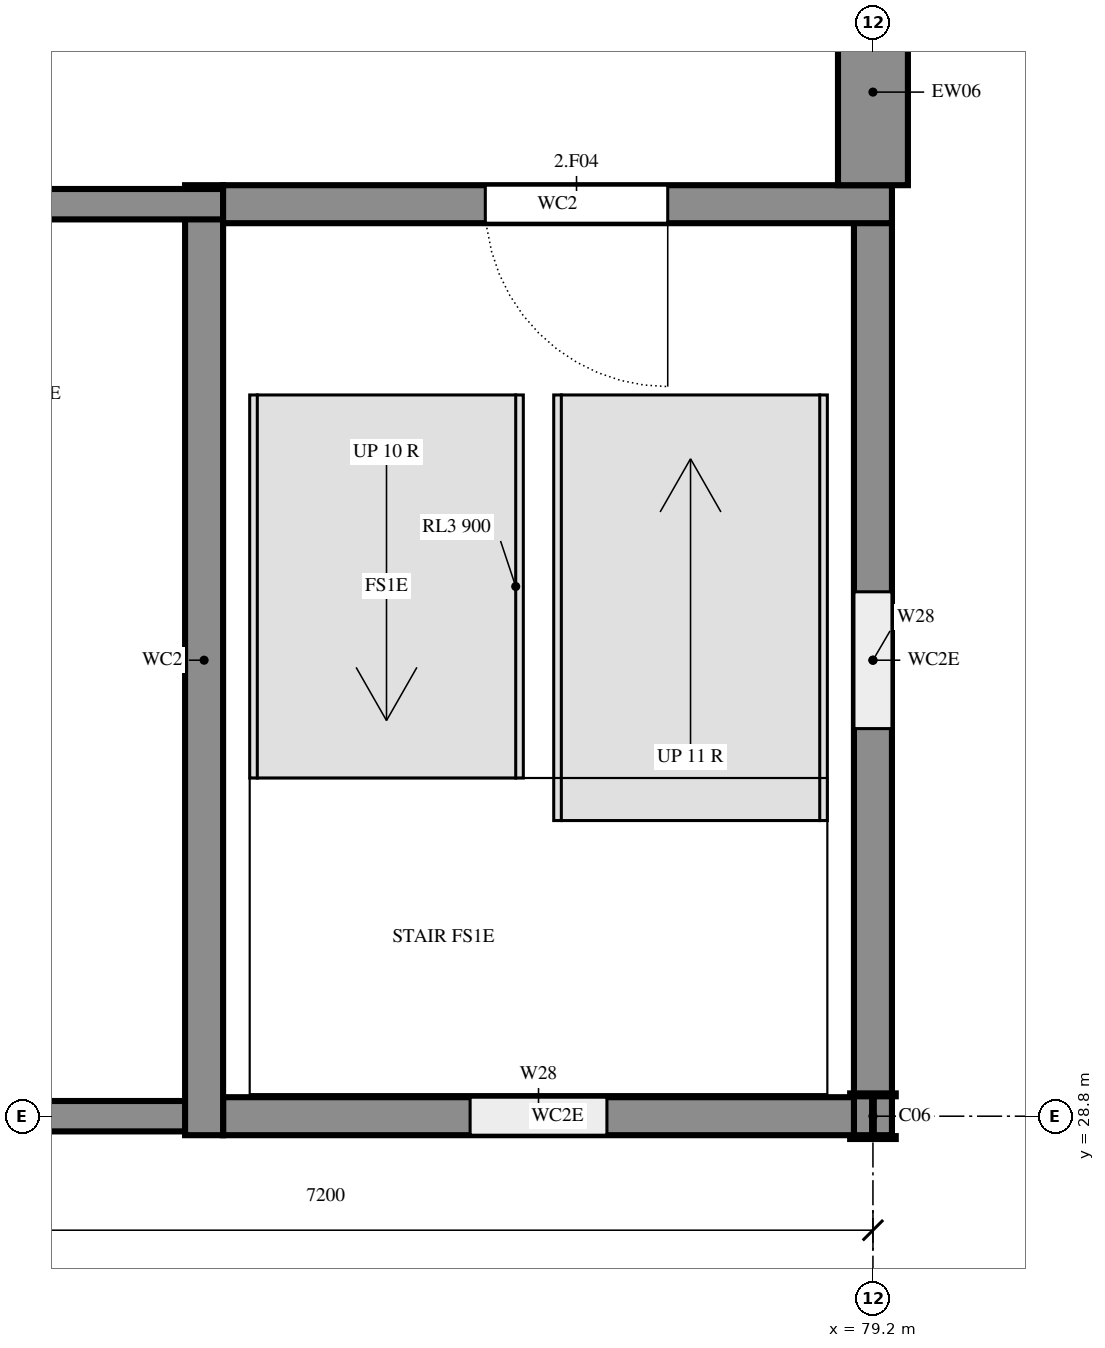
"""IFC4 building model, lengths in metres.
Left out: names, types, materials, properties, quantities, classifications, styles, units other than length and angle.
Written with IfcOpenShell. Run it as: python <this file> out.ifc"""

import sys

from ifc_helpers import new_model, si_unit, direction, frame, frame_2d, origin, origin_2d, place, context, subcontext, project, spatial, rectangle, i_section, extrude, element, fill, save


model = new_model("IFC4")
c1 = context("Model", 3, precision=1e-05, world=origin(), true_north=direction((0.0, 1.0)))
c2 = subcontext(c1, "Body", "Model", "MODEL_VIEW")
j1 = project(units=[si_unit("LENGTHUNIT", "METRE"), si_unit("PLANEANGLEUNIT", "RADIAN")], contexts=[c1])
p1 = place(None, origin())
s1 = spatial("IfcSite", under=j1, at=p1, CompositionType="ELEMENT")
p2 = place(p1, origin())
s2 = spatial("IfcBuilding", under=s1, at=p2, CompositionType="ELEMENT")
p3 = place(p2, frame((0.0, 0.0, 7.2)))
s3 = spatial("IfcBuildingStorey", under=s2, at=p3, CompositionType="ELEMENT", Elevation=7.2)
p4 = place(p3, frame((79.2, 28.8, 0.0), z_axis=(0.0, 0.0, 1.0), x_axis=(1.0, 0.0, 0.0)))
e1 = element("IfcColumn", 1, at=p4, inside=s3, PredefinedType="COLUMN", context=c2, shape_type="SweptSolid", body=[
    extrude(i_section(OverallWidth=0.3, OverallDepth=0.3, WebThickness=0.011, FlangeThickness=0.019, FilletRadius=0.027, at=origin_2d()), origin(), (0.0, 0.0, 1.0), 3.6),
])
p5 = place(p3, frame((71.9, 28.8, 0.0), z_axis=(0.0, 0.0, 1.0), x_axis=(1.0, 0.0, 0.0)))
e2 = element("IfcWall", 2, at=p5, inside=s3, PredefinedType="SHEAR", context=c2, shape_type="SweptSolid", body=[
    extrude(rectangle(XDim=3.025, YDim=0.2, at=frame_2d((1.513, 0.0))), origin(), (0.0, 0.0, 1.0), 3.6),
])
p6 = place(p3, frame((74.925, 28.8, 0.0), z_axis=(0.0, 0.0, 1.0), x_axis=(1.0, 0.0, 0.0)))
e3 = element("IfcWall", 3, at=p6, inside=s3, PredefinedType="SHEAR", context=c2, shape_type="SweptSolid", body=[
    extrude(rectangle(XDim=4.4, YDim=0.25, at=frame_2d((2.2, 0.0))), origin(), (0.0, 0.0, 1.0), 3.6),
])
p7 = place(p6, frame((1.625, 0.0, 0.6)))
e4 = element("IfcOpeningElement", 4, at=p7, cuts=e3, PredefinedType="OPENING", context=c2, shape_type="SweptSolid", body=[
    extrude(rectangle(XDim=0.9, YDim=2.1, at=frame_2d((0.45, 1.05))), frame((0.0, 0.135, 0.0), z_axis=(0.0, -1.0, 0.0), x_axis=(1.0, 0.0, 0.0)), (0.0, 0.0, 1.0), 0.27),
])
p8 = place(p3, frame((79.2, 28.675, 0.0), z_axis=(0.0, 0.0, 1.0), x_axis=(0.0, 1.0, 0.0)))
e5 = element("IfcWall", 5, at=p8, inside=s3, PredefinedType="SHEAR", context=c2, shape_type="SweptSolid", body=[
    extrude(rectangle(XDim=6.25, YDim=0.25, at=frame_2d((3.125, 0.0))), origin(), (0.0, 0.0, 1.0), 3.6),
])
p9 = place(p8, frame((2.675, 0.0, 0.6)))
e6 = element("IfcOpeningElement", 6, at=p9, cuts=e5, PredefinedType="OPENING", context=c2, shape_type="SweptSolid", body=[
    extrude(rectangle(XDim=0.9, YDim=2.1, at=frame_2d((0.45, 1.05))), frame((0.0, 0.135, 0.0), z_axis=(0.0, -1.0, 0.0), x_axis=(1.0, 0.0, 0.0)), (0.0, 0.0, 1.0), 0.27),
])
p10 = place(p3, frame((74.8, 34.925, 0.0), z_axis=(0.0, 0.0, 1.0), x_axis=(0.0, -1.0, 0.0)))
e7 = element("IfcWall", 7, at=p10, inside=s3, PredefinedType="SHEAR", context=c2, shape_type="SweptSolid", body=[
    extrude(rectangle(XDim=6.25, YDim=0.25, at=frame_2d((3.125, 0.0))), origin(), (0.0, 0.0, 1.0), 3.6),
])
p11 = place(p3, frame((74.925, 34.8, 0.0), z_axis=(0.0, 0.0, 1.0), x_axis=(-1.0, 0.0, 0.0)))
e8 = element("IfcWall", 8, at=p11, inside=s3, PredefinedType="SHEAR", context=c2, shape_type="SweptSolid", body=[
    extrude(rectangle(XDim=3.025, YDim=0.2, at=frame_2d((1.513, 0.0))), origin(), (0.0, 0.0, 1.0), 3.6),
])
p12 = place(p3, frame((79.325, 34.8, 0.0), z_axis=(0.0, 0.0, 1.0), x_axis=(-1.0, 0.0, 0.0)))
e9 = element("IfcWall", 9, at=p12, inside=s3, PredefinedType="SHEAR", context=c2, shape_type="SweptSolid", body=[
    extrude(rectangle(XDim=4.4, YDim=0.25, at=frame_2d((2.2, 0.0))), origin(), (0.0, 0.0, 1.0), 3.6),
])
p13 = place(p12, frame((1.475, 0.0, 0.0)))
e10 = element("IfcOpeningElement", 10, at=p13, cuts=e9, PredefinedType="OPENING", context=c2, shape_type="SweptSolid", body=[
    extrude(rectangle(XDim=1.2, YDim=2.4, at=frame_2d((0.6, 1.2))), frame((0.0, 0.135, 0.0), z_axis=(0.0, -1.0, 0.0), x_axis=(1.0, 0.0, 0.0)), (0.0, 0.0, 1.0), 0.27),
])
p14 = place(p3, frame((79.2, 34.925, 0.0), z_axis=(0.0, 0.0, 1.0), x_axis=(0.0, 1.0, 0.0)))
e11 = element("IfcWall", 11, at=p14, inside=s3, PredefinedType="SOLIDWALL", context=c2, shape_type="SweptSolid", body=[
    extrude(rectangle(XDim=1.225, YDim=0.46, at=frame_2d((0.612, 0.0))), origin(), (0.0, 0.0, 1.0), 3.22),
])
p15 = place(p9, origin())
e12 = element("IfcWindow", 12, at=p15, inside=s3, PartitioningType="SINGLE_PANEL", PredefinedType="WINDOW", context=c2, shape_type="SweptSolid", body=[
    extrude(rectangle(XDim=0.9, YDim=2.1, at=frame_2d((0.45, 1.05))), frame((0.0, 0.03, 0.0), z_axis=(0.0, -1.0, 0.0), x_axis=(1.0, 0.0, 0.0)), (0.0, 0.0, 1.0), 0.06),
])
fill(e6, e12)
p16 = place(p7, origin())
e13 = element("IfcWindow", 13, at=p16, inside=s3, PartitioningType="SINGLE_PANEL", PredefinedType="WINDOW", context=c2, shape_type="SweptSolid", body=[
    extrude(rectangle(XDim=0.9, YDim=2.1, at=frame_2d((0.45, 1.05))), frame((0.0, 0.03, 0.0), z_axis=(0.0, -1.0, 0.0), x_axis=(1.0, 0.0, 0.0)), (0.0, 0.0, 1.0), 0.06),
])
fill(e4, e13)
p17 = place(p13, origin())
e14 = element("IfcDoor", 14, at=p17, inside=s3, OperationType="SINGLE_SWING_RIGHT", PredefinedType="DOOR", context=c2, shape_type="SweptSolid", body=[
    extrude(rectangle(XDim=1.2, YDim=2.4, at=frame_2d((0.6, 1.2))), frame((0.0, 0.025, 0.0), z_axis=(0.0, -1.0, 0.0), x_axis=(1.0, 0.0, 0.0)), (0.0, 0.0, 1.0), 0.05),
])
fill(e10, e14)
save(model, sys.argv[1])
